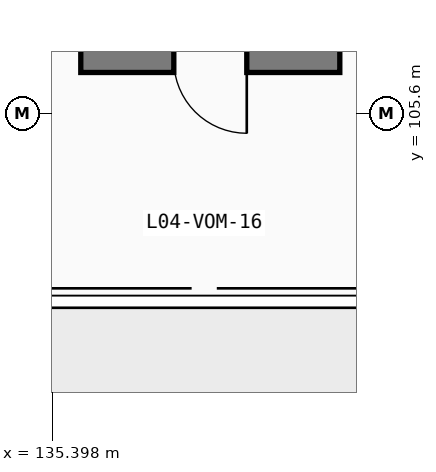
"""IFC4 building model, lengths in metres.
Left out: names, types, materials, properties, quantities, classifications, styles, units other than length and angle.
Written with IfcOpenShell. Run it as: python <this file> out.ifc"""

import sys

from ifc_helpers import new_model, si_unit, direction, frame, frame_2d, origin, place, context, subcontext, project, spatial, rectangle, extrude, element, fill, save


model = new_model("IFC4")
c1 = context("Model", 3, precision=1e-05, world=origin(), true_north=direction((0.0, 1.0)))
c2 = subcontext(c1, "Body", "Model", "MODEL_VIEW")
j1 = project(units=[si_unit("LENGTHUNIT", "METRE"), si_unit("PLANEANGLEUNIT", "RADIAN")], contexts=[c1])
p1 = place(None, origin())
s1 = spatial("IfcSite", under=j1, at=p1, CompositionType="ELEMENT")
p2 = place(p1, origin())
s2 = spatial("IfcBuilding", under=s1, at=p2, CompositionType="ELEMENT")
p3 = place(p2, frame((0.0, 0.0, 18.6)))
s3 = spatial("IfcBuildingStorey", under=s2, at=p3, CompositionType="ELEMENT", Elevation=18.6)
p4 = place(p3, frame((135.87, 106.47, 0.0), z_axis=(0.0, 0.0, 1.0), x_axis=(1.0, 0.0, 0.0)))
e1 = element("IfcWall", 1, at=p4, inside=s3, PredefinedType="SHEAR", context=c2, shape_type="SweptSolid", body=[
    extrude(rectangle(XDim=4.26, YDim=0.4, at=frame_2d((2.13, 0.0))), origin(), (0.0, 0.0, 1.0), 4.24),
])
p5 = place(p4, frame((2.73, 0.0, 0.0), z_axis=(0.0, 0.0, 1.0), x_axis=(-1.0, 0.0, 0.0)))
e2 = element("IfcOpeningElement", 2, at=p5, cuts=e1, PredefinedType="OPENING", context=c2, shape_type="SweptSolid", body=[
    extrude(rectangle(XDim=1.2, YDim=2.2, at=frame_2d((0.6, 1.1))), frame((0.0, 0.21, 0.0), z_axis=(0.0, -1.0, 0.0), x_axis=(1.0, 0.0, 0.0)), (0.0, 0.0, 1.0), 0.42),
])
p6 = place(p5, origin())
e3 = element("IfcDoor", 3, at=p6, inside=s3, OperationType="SINGLE_SWING_LEFT", PredefinedType="DOOR", context=c2, shape_type="SweptSolid", body=[
    extrude(rectangle(XDim=1.2, YDim=2.2, at=frame_2d((0.6, 1.1))), frame((0.0, 0.025, 0.0), z_axis=(0.0, -1.0, 0.0), x_axis=(1.0, 0.0, 0.0)), (0.0, 0.0, 1.0), 0.05),
])
fill(e2, e3)
save(model, sys.argv[1])
